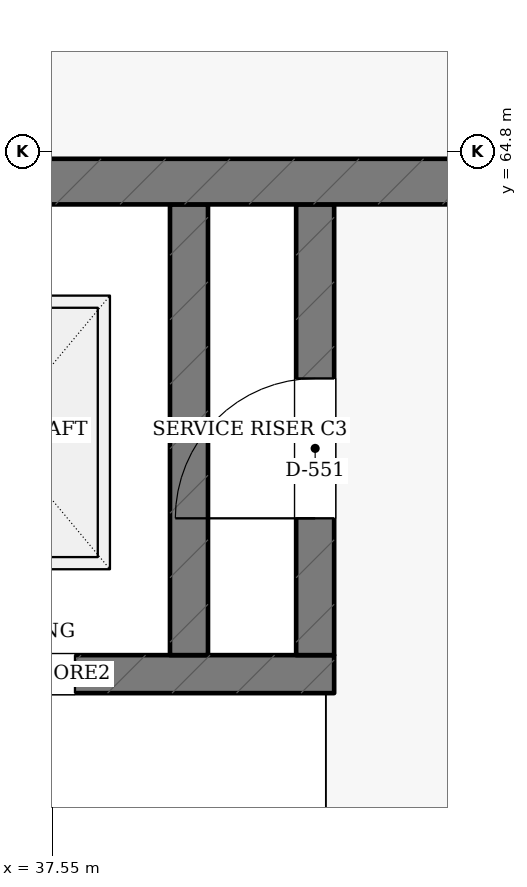
"""IFC4 building model, lengths in metres.
Left out: names, types, materials, properties, quantities, classifications, styles, units other than length and angle.
Written with IfcOpenShell. Run it as: python <this file> out.ifc"""

import sys

from ifc_helpers import new_model, si_unit, direction, frame, frame_2d, origin, place, context, subcontext, project, spatial, rectangle, extrude, element, fill, save


model = new_model("IFC4")
c1 = context("Model", 3, precision=1e-05, world=origin(), true_north=direction((0.0, 1.0)))
c2 = subcontext(c1, "Body", "Model", "MODEL_VIEW")
j1 = project(units=[si_unit("LENGTHUNIT", "METRE"), si_unit("PLANEANGLEUNIT", "RADIAN")], contexts=[c1])
p1 = place(None, origin())
s1 = spatial("IfcSite", under=j1, at=p1, CompositionType="ELEMENT")
p2 = place(p1, origin())
s2 = spatial("IfcBuilding", under=s1, at=p2, CompositionType="ELEMENT")
p3 = place(p2, frame((0.0, 0.0, 9.9)))
s3 = spatial("IfcBuildingStorey", under=s2, at=p3, CompositionType="ELEMENT", Elevation=9.9)
p4 = place(p3, frame((35.825, 61.36, 0.0), z_axis=(0.0, 0.0, 1.0), x_axis=(1.0, 0.0, 0.0)))
e1 = element("IfcWall", 1, at=p4, inside=s3, PredefinedType="SHEAR", context=c2, shape_type="SweptSolid", body=[
    extrude(rectangle(XDim=3.58, YDim=0.25, at=frame_2d((1.79, 0.0))), origin(), (0.0, 0.0, 1.0), 3.6),
])
p5 = place(p4, frame((0.775, 0.0, 0.0)))
e2 = element("IfcOpeningElement", 2, at=p5, cuts=e1, PredefinedType="OPENING", context=c2, shape_type="SweptSolid", body=[
    extrude(rectangle(XDim=1.1, YDim=2.15, at=frame_2d((0.55, 1.075))), frame((0.0, 0.135, 0.0), z_axis=(0.0, -1.0, 0.0), x_axis=(1.0, 0.0, 0.0)), (0.0, 0.0, 1.0), 0.27),
])
p6 = place(p3, frame((38.45, 61.485, 0.0), z_axis=(0.0, 0.0, 1.0), x_axis=(0.0, 1.0, 0.0)))
e3 = element("IfcWall", 3, at=p6, inside=s3, PredefinedType="SHEAR", context=c2, shape_type="SweptSolid", body=[
    extrude(rectangle(XDim=2.965, YDim=0.25, at=frame_2d((1.482, 0.0))), origin(), (0.0, 0.0, 1.0), 3.6),
])
p7 = place(p3, frame((39.28, 61.485, 0.0), z_axis=(0.0, 0.0, 1.0), x_axis=(0.0, 1.0, 0.0)))
e4 = element("IfcWall", 4, at=p7, inside=s3, PredefinedType="SHEAR", context=c2, shape_type="SweptSolid", body=[
    extrude(rectangle(XDim=2.965, YDim=0.25, at=frame_2d((1.482, 0.0))), origin(), (0.0, 0.0, 1.0), 3.6),
])
p8 = place(p7, frame((0.9, 0.0, 0.0)))
e5 = element("IfcOpeningElement", 5, at=p8, cuts=e4, PredefinedType="OPENING", context=c2, shape_type="SweptSolid", body=[
    extrude(rectangle(XDim=0.92, YDim=2.05, at=frame_2d((0.46, 1.025))), frame((0.0, 0.135, 0.0), z_axis=(0.0, -1.0, 0.0), x_axis=(1.0, 0.0, 0.0)), (0.0, 0.0, 1.0), 0.27),
])
p9 = place(p3, frame((28.85, 64.6, 0.0), z_axis=(0.0, 0.0, 1.0), x_axis=(1.0, 0.0, 0.0)))
e6 = element("IfcWall", 6, at=p9, inside=s3, PredefinedType="SHEAR", context=c2, shape_type="SweptSolid", body=[
    extrude(rectangle(XDim=14.35, YDim=0.3, at=frame_2d((7.175, 0.0))), origin(), (0.0, 0.0, 1.0), 3.6),
])
p10 = place(p5, origin())
e7 = element("IfcDoor", 7, at=p10, inside=s3, OperationType="SLIDING_TO_LEFT", PredefinedType="DOOR", context=c2, shape_type="SweptSolid", body=[
    extrude(rectangle(XDim=1.1, YDim=2.15, at=frame_2d((0.55, 1.075))), frame((0.0, 0.025, 0.0), z_axis=(0.0, -1.0, 0.0), x_axis=(1.0, 0.0, 0.0)), (0.0, 0.0, 1.0), 0.05),
])
fill(e2, e7)
p11 = place(p8, origin())
e8 = element("IfcDoor", 8, at=p11, inside=s3, OperationType="SINGLE_SWING_LEFT", PredefinedType="DOOR", context=c2, shape_type="SweptSolid", body=[
    extrude(rectangle(XDim=0.92, YDim=2.05, at=frame_2d((0.46, 1.025))), frame((0.0, 0.025, 0.0), z_axis=(0.0, -1.0, 0.0), x_axis=(1.0, 0.0, 0.0)), (0.0, 0.0, 1.0), 0.05),
])
fill(e5, e8)
save(model, sys.argv[1])
